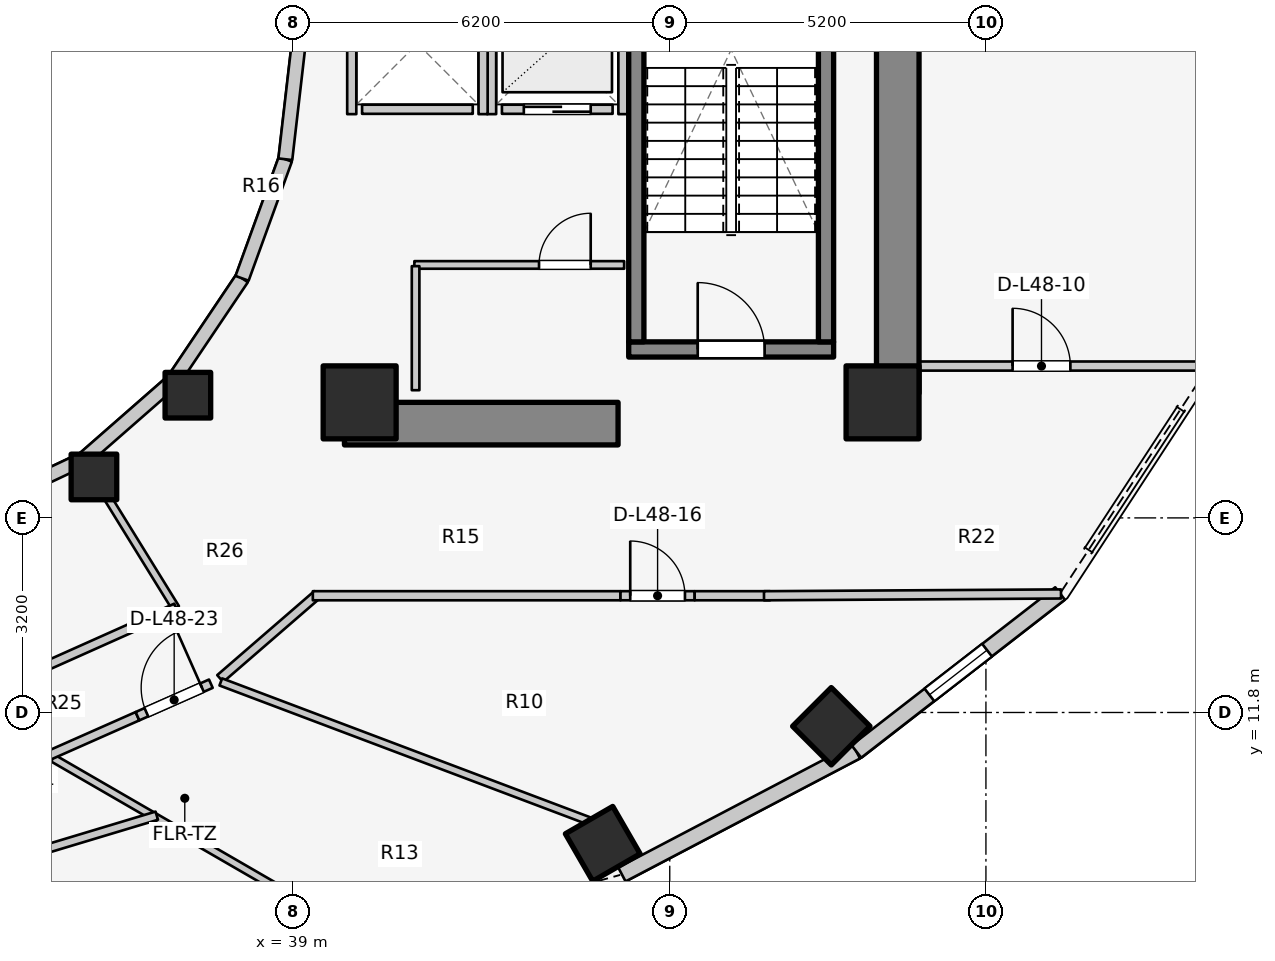
"""IFC4 building model, lengths in metres.
Left out: names, types, materials, properties, quantities, classifications, styles, units other than length and angle.
Written with IfcOpenShell. Run it as: python <this file> out.ifc"""

import sys

from ifc_helpers import new_model, si_unit, direction, frame, frame_2d, origin, origin_2d, place, context, subcontext, project, spatial, rectangle, extrude, element, fill, save


model = new_model("IFC4")
c1 = context("Model", 3, precision=1e-05, world=origin(), true_north=direction((0.0, 1.0)))
c2 = subcontext(c1, "Body", "Model", "MODEL_VIEW")
j1 = project(units=[si_unit("LENGTHUNIT", "METRE"), si_unit("PLANEANGLEUNIT", "RADIAN")], contexts=[c1])
p1 = place(None, origin())
s1 = spatial("IfcSite", under=j1, at=p1, CompositionType="ELEMENT")
p2 = place(p1, origin())
s2 = spatial("IfcBuilding", under=s1, at=p2, CompositionType="ELEMENT")
p3 = place(p2, frame((0.0, 0.0, 159.1)))
s3 = spatial("IfcBuildingStorey", under=s2, at=p3, CompositionType="ELEMENT", Elevation=159.1)
p4 = place(p3, frame((48.95, 17.05, 0.0), z_axis=(0.0, 0.0, 1.0), x_axis=(0.0, 1.0, 0.0)))
e1 = element("IfcWall", 1, at=p4, inside=s3, PredefinedType="SHEAR", context=c2, shape_type="SweptSolid", body=[
    extrude(rectangle(XDim=12.8, YDim=0.7, at=frame_2d((6.4, 0.0))), origin(), (0.0, 0.0, 1.0), 3.1),
])
p5 = place(p3, frame((39.85, 16.55, 0.0), z_axis=(0.0, 0.0, 1.0), x_axis=(1.0, 0.0, 0.0)))
e2 = element("IfcWall", 2, at=p5, inside=s3, PredefinedType="SHEAR", context=c2, shape_type="SweptSolid", body=[
    extrude(rectangle(XDim=4.5, YDim=0.7, at=frame_2d((2.25, 0.0))), origin(), (0.0, 0.0, 1.0), 3.1),
])
p6 = place(p3, frame((44.525, 17.77, 0.0), z_axis=(0.0, 0.0, 1.0), x_axis=(1.0, 0.0, 0.0)))
e3 = element("IfcWall", 3, at=p6, inside=s3, PredefinedType="SOLIDWALL", context=c2, shape_type="SweptSolid", body=[
    extrude(rectangle(XDim=3.37, YDim=0.25, at=frame_2d((1.685, 0.0))), origin(), (0.0, 0.0, 1.0), 3.1),
])
p7 = place(p6, frame((1.135, 0.0, 0.0)))
e4 = element("IfcOpeningElement", 4, at=p7, cuts=e3, PredefinedType="OPENING", context=c2, shape_type="SweptSolid", body=[
    extrude(rectangle(XDim=1.1, YDim=2.1, at=frame_2d((0.55, 1.05))), frame((0.0, 0.135, 0.0), z_axis=(0.0, -1.0, 0.0), x_axis=(1.0, 0.0, 0.0)), (0.0, 0.0, 1.0), 0.27),
])
for number, where, z_axis, x_axis in (
    (5, (44.65, 17.895, 0.0), (0.0, 0.0, 1.0), (0.0, 1.0, 0.0)),
    (6, (47.77, 17.895, 0.0), (0.0, 0.0, 1.0), (0.0, 1.0, 0.0)),
):
    element("IfcWall", number, at=place(p3, frame(where, z_axis=z_axis, x_axis=x_axis)), inside=s3, PredefinedType="SOLIDWALL", context=c2, shape_type="SweptSolid", body=[
        extrude(rectangle(XDim=7.81, YDim=0.25, at=frame_2d((3.905, 0.0))), origin(), (0.0, 0.0, 1.0), 3.1),
    ])
for number, where, z_axis, x_axis in (
    (7, (40.1, 16.9, 0.0), (0.0, 0.0, 1.0), (1.0, 0.0, 0.0)),
    (8, (48.7, 16.9, 0.0), (0.0, 0.0, 1.0), (1.0, 0.0, 0.0)),
):
    element("IfcColumn", number, at=place(p3, frame(where, z_axis=z_axis, x_axis=x_axis)), inside=s3, PredefinedType="COLUMN", context=c2, shape_type="SweptSolid", body=[
        extrude(rectangle(XDim=1.2, YDim=1.2, at=origin_2d()), origin(), (0.0, 0.0, 1.0), 3.1),
    ])
p8 = place(p3, frame((35.73, 15.673, 0.0), z_axis=(0.0, 0.0, 1.0), x_axis=(1.0, 0.0, 0.0)))
e9 = element("IfcColumn", 9, at=p8, inside=s3, PredefinedType="COLUMN", context=c2, shape_type="SweptSolid", body=[
    extrude(rectangle(XDim=0.75, YDim=0.75, at=origin_2d()), origin(), (0.0, 0.0, 1.0), 3.1),
])
p9 = place(p3, frame((44.098, 9.641, 0.0), z_axis=(0.0, 0.0, 1.0), x_axis=(0.5, -0.866025403784, 0.0)))
e10 = element("IfcColumn", 10, at=p9, inside=s3, PredefinedType="COLUMN", context=c2, shape_type="SweptSolid", body=[
    extrude(rectangle(XDim=0.9, YDim=0.9, at=origin_2d()), origin(), (0.0, 0.0, 1.0), 3.1),
])
p10 = place(p3, frame((37.275, 17.018, 0.0), z_axis=(0.0, 0.0, 1.0), x_axis=(1.0, 0.0, 0.0)))
e11 = element("IfcColumn", 11, at=p10, inside=s3, PredefinedType="COLUMN", context=c2, shape_type="SweptSolid", body=[
    extrude(rectangle(XDim=0.75, YDim=0.75, at=origin_2d()), origin(), (0.0, 0.0, 1.0), 3.1),
])
p11 = place(p3, frame((47.857, 11.573, 0.0), z_axis=(0.0, 0.0, 1.0), x_axis=(0.707106781187, -0.707106781187, 0.0)))
e12 = element("IfcColumn", 12, at=p11, inside=s3, PredefinedType="COLUMN", context=c2, shape_type="SweptSolid", body=[
    extrude(rectangle(XDim=0.9, YDim=0.9, at=origin_2d()), origin(), (0.0, 0.0, 1.0), 3.1),
])
p12 = place(p3, frame((33.843, 15.157, 0.0), z_axis=(0.0, 0.0, 1.0), x_axis=(0.904179699603, 0.427152280606, 0.0)))
e13 = element("IfcWall", 13, at=p12, inside=s3, PredefinedType="STANDARD", context=c2, shape_type="SweptSolid", body=[
    extrude(rectangle(XDim=1.899, YDim=0.23, at=frame_2d((0.95, 0.0))), origin(), (0.0, 0.0, 1.0), 1.22),
])
p13 = place(p3, frame((35.56, 15.968, 0.0), z_axis=(0.0, 0.0, 1.0), x_axis=(0.752576694707, 0.658504607869, 0.0)))
e14 = element("IfcWall", 14, at=p13, inside=s3, PredefinedType="STANDARD", context=c2, shape_type="SweptSolid", body=[
    extrude(rectangle(XDim=1.959, YDim=0.23, at=frame_2d((0.98, 0.0))), origin(), (0.0, 0.0, 1.0), 1.22),
])
p14 = place(p3, frame((37.035, 17.258, 0.0), z_axis=(0.0, 0.0, 1.0), x_axis=(0.558197800898, 0.829707909492, 0.0)))
e15 = element("IfcWall", 15, at=p14, inside=s3, PredefinedType="STANDARD", context=c2, shape_type="SweptSolid", body=[
    extrude(rectangle(XDim=2.027, YDim=0.23, at=frame_2d((1.013, 0.0))), origin(), (0.0, 0.0, 1.0), 1.22),
])
p15 = place(p3, frame((38.166, 18.94, 0.0), z_axis=(0.0, 0.0, 1.0), x_axis=(0.341423187295, 0.93990968033, 0.0)))
e16 = element("IfcWall", 16, at=p15, inside=s3, PredefinedType="STANDARD", context=c2, shape_type="SweptSolid", body=[
    extrude(rectangle(XDim=2.084, YDim=0.23, at=frame_2d((1.042, 0.0))), origin(), (0.0, 0.0, 1.0), 2.56),
])
p16 = place(p3, frame((38.877, 20.898, 0.0), z_axis=(0.0, 0.0, 1.0), x_axis=(0.114711713601, 0.993398823617, 0.0)))
e17 = element("IfcWall", 17, at=p16, inside=s3, PredefinedType="STANDARD", context=c2, shape_type="SweptSolid", body=[
    extrude(rectangle(XDim=2.115, YDim=0.23, at=frame_2d((1.058, 0.0))), origin(), (0.0, 0.0, 1.0), 2.56),
])
p17 = place(p3, frame((44.413, 9.137, 0.0), z_axis=(0.0, 0.0, 1.0), x_axis=(0.885660265226, 0.464333818065, 0.0)))
e18 = element("IfcWall", 18, at=p17, inside=s3, PredefinedType="STANDARD", context=c2, shape_type="SweptSolid", body=[
    extrude(rectangle(XDim=4.354, YDim=0.26, at=frame_2d((2.177, 0.0))), origin(), (0.0, 0.0, 1.0), 1.22),
])
p18 = place(p3, frame((48.269, 11.158, 0.0), z_axis=(0.0, 0.0, 1.0), x_axis=(0.790185650662, 0.612867552973, 0.0)))
e19 = element("IfcWall", 19, at=p18, inside=s3, PredefinedType="STANDARD", context=c2, shape_type="SweptSolid", body=[
    extrude(rectangle(XDim=4.239, YDim=0.26, at=frame_2d((2.12, 0.0))), origin(), (0.0, 0.0, 1.0), 1.22),
])
p19 = place(p18, frame((1.52, 0.0, 0.15)))
e20 = element("IfcOpeningElement", 20, at=p19, cuts=e19, PredefinedType="OPENING", context=c2, shape_type="SweptSolid", body=[
    extrude(rectangle(XDim=1.2, YDim=0.9, at=frame_2d((0.6, 0.45))), frame((0.0, 0.14, 0.0), z_axis=(0.0, -1.0, 0.0), x_axis=(1.0, 0.0, 0.0)), (0.0, 0.0, 1.0), 0.28),
])
p20 = place(p3, frame((42.44, 21.72, 0.0), z_axis=(0.0, 0.0, 1.0), x_axis=(1.0, 0.0, 0.0)))
e21 = element("IfcWall", 21, at=p20, inside=s3, PredefinedType="SOLIDWALL", context=c2, shape_type="SweptSolid", body=[
    extrude(rectangle(XDim=1.82, YDim=0.15, at=frame_2d((0.91, 0.0))), origin(), (0.0, 0.0, 1.0), 2.575),
])
p21 = place(p20, frame((0.36, 0.0, 0.0)))
e22 = element("IfcOpeningElement", 22, at=p21, cuts=e21, PredefinedType="OPENING", context=c2, shape_type="SweptSolid", body=[
    extrude(rectangle(XDim=1.1, YDim=2.1, at=frame_2d((0.55, 1.05))), frame((0.0, 0.085, 0.0), z_axis=(0.0, -1.0, 0.0), x_axis=(1.0, 0.0, 0.0)), (0.0, 0.0, 1.0), 0.17),
])
for number, where, z_axis, x_axis in (
    (23, (42.27, 21.64, 0.0), (0.0, 0.0, 1.0), (0.0, 1.0, 0.0)),
    (24, (44.43, 21.64, 0.0), (0.0, 0.0, 1.0), (0.0, 1.0, 0.0)),
):
    element("IfcWall", number, at=place(p3, frame(where, z_axis=z_axis, x_axis=x_axis)), inside=s3, PredefinedType="SOLIDWALL", context=c2, shape_type="SweptSolid", body=[
        extrude(rectangle(XDim=2.32, YDim=0.15, at=frame_2d((1.16, 0.0))), origin(), (0.0, 0.0, 1.0), 2.575),
    ])
p22 = place(p3, frame((40.14, 21.72, 0.0), z_axis=(0.0, 0.0, 1.0), x_axis=(1.0, 0.0, 0.0)))
e25 = element("IfcWall", 25, at=p22, inside=s3, PredefinedType="SOLIDWALL", context=c2, shape_type="SweptSolid", body=[
    extrude(rectangle(XDim=1.82, YDim=0.15, at=frame_2d((0.91, 0.0))), origin(), (0.0, 0.0, 1.0), 2.12),
])
p23 = place(p3, frame((39.97, 21.64, 0.0), z_axis=(0.0, 0.0, 1.0), x_axis=(0.0, 1.0, 0.0)))
e26 = element("IfcWall", 26, at=p23, inside=s3, PredefinedType="SOLIDWALL", context=c2, shape_type="SweptSolid", body=[
    extrude(rectangle(XDim=2.32, YDim=0.15, at=frame_2d((1.16, 0.0))), origin(), (0.0, 0.0, 1.0), 2.12),
])
p24 = place(p3, frame((42.13, 21.64, 0.0), z_axis=(0.0, 0.0, 1.0), x_axis=(0.0, 1.0, 0.0)))
e27 = element("IfcWall", 27, at=p24, inside=s3, PredefinedType="SOLIDWALL", context=c2, shape_type="SweptSolid", body=[
    extrude(rectangle(XDim=2.32, YDim=0.15, at=frame_2d((1.16, 0.0))), origin(), (0.0, 0.0, 1.0), 2.575),
])
p25 = place(p3, frame((41.0, 19.16, 0.0), z_axis=(0.0, 0.0, 1.0), x_axis=(1.0, 0.0, 0.0)))
e28 = element("IfcWall", 28, at=p25, inside=s3, PredefinedType="PARTITIONING", context=c2, shape_type="SweptSolid", body=[
    extrude(rectangle(XDim=3.45, YDim=0.125, at=frame_2d((1.725, 0.0))), origin(), (0.0, 0.0, 1.0), 2.12),
])
p26 = place(p25, frame((2.05, 0.0, 0.0)))
e29 = element("IfcOpeningElement", 29, at=p26, cuts=e28, PredefinedType="OPENING", context=c2, shape_type="SweptSolid", body=[
    extrude(rectangle(XDim=0.85, YDim=2.05, at=frame_2d((0.425, 1.025))), frame((0.0, 0.073, 0.0), z_axis=(0.0, -1.0, 0.0), x_axis=(1.0, 0.0, 0.0)), (0.0, 0.0, 1.0), 0.145),
])
p27 = place(p3, frame((41.02, 17.1, 0.0), z_axis=(0.0, 0.0, 1.0), x_axis=(0.0, 1.0, 0.0)))
e30 = element("IfcWall", 30, at=p27, inside=s3, PredefinedType="PARTITIONING", context=c2, shape_type="SweptSolid", body=[
    extrude(rectangle(XDim=2.04, YDim=0.125, at=frame_2d((1.02, 0.0))), origin(), (0.0, 0.0, 1.0), 2.575),
])
p28 = place(p3, frame((48.95, 17.497, 0.0), z_axis=(0.0, 0.0, 1.0), x_axis=(1.0, 0.0, 0.0)))
e31 = element("IfcWall", 31, at=p28, inside=s3, PredefinedType="PARTITIONING", context=c2, shape_type="SweptSolid", body=[
    extrude(rectangle(XDim=5.14, YDim=0.15, at=frame_2d((2.57, 0.0))), origin(), (0.0, 0.0, 1.0), 2.575),
])
p29 = place(p28, frame((1.889, 0.0, 0.0)))
e32 = element("IfcOpeningElement", 32, at=p29, cuts=e31, PredefinedType="OPENING", context=c2, shape_type="SweptSolid", body=[
    extrude(rectangle(XDim=0.95, YDim=2.1, at=frame_2d((0.475, 1.05))), frame((0.0, 0.085, 0.0), z_axis=(0.0, -1.0, 0.0), x_axis=(1.0, 0.0, 0.0)), (0.0, 0.0, 1.0), 0.17),
])
p30 = place(p3, frame((37.807, 12.358, 0.0), z_axis=(0.0, 0.0, 1.0), x_axis=(0.756055312247, 0.654507727092, 0.0)))
e33 = element("IfcWall", 33, at=p30, inside=s3, PredefinedType="PARTITIONING", context=c2, shape_type="SweptSolid", body=[
    extrude(rectangle(XDim=2.111, YDim=0.15, at=frame_2d((1.055, 0.0))), origin(), (0.0, 0.0, 1.0), 2.019),
])
p31 = place(p3, frame((39.33, 13.72, 0.0), z_axis=(0.0, 0.0, 1.0), x_axis=(1.0, 0.0, 0.0)))
e34 = element("IfcWall", 34, at=p31, inside=s3, PredefinedType="PARTITIONING", context=c2, shape_type="SweptSolid", body=[
    extrude(rectangle(XDim=5.06, YDim=0.15, at=frame_2d((2.53, 0.0))), origin(), (0.0, 0.0, 1.0), 2.019),
])
p32 = place(p3, frame((44.39, 13.72, 0.0), z_axis=(0.0, 0.0, 1.0), x_axis=(1.0, 0.0, 0.0)))
e35 = element("IfcWall", 35, at=p32, inside=s3, PredefinedType="PARTITIONING", context=c2, shape_type="SweptSolid", body=[
    extrude(rectangle(XDim=1.22, YDim=0.15, at=frame_2d((0.61, 0.0))), origin(), (0.0, 0.0, 1.0), 2.575),
])
p33 = place(p32, frame((0.16, 0.0, 0.0)))
e36 = element("IfcOpeningElement", 36, at=p33, cuts=e35, PredefinedType="OPENING", context=c2, shape_type="SweptSolid", body=[
    extrude(rectangle(XDim=0.9, YDim=2.1, at=frame_2d((0.45, 1.05))), frame((0.0, 0.085, 0.0), z_axis=(0.0, -1.0, 0.0), x_axis=(1.0, 0.0, 0.0)), (0.0, 0.0, 1.0), 0.17),
])
p34 = place(p3, frame((45.61, 13.72, 0.0), z_axis=(0.0, 0.0, 1.0), x_axis=(1.0, 0.0, 0.0)))
e37 = element("IfcWall", 37, at=p34, inside=s3, PredefinedType="PARTITIONING", context=c2, shape_type="SweptSolid", body=[
    extrude(rectangle(XDim=1.24, YDim=0.15, at=frame_2d((0.62, 0.0))), origin(), (0.0, 0.0, 1.0), 2.575),
])
p35 = place(p3, frame((46.75, 13.72, 0.0), z_axis=(0.0, 0.0, 1.0), x_axis=(0.999981712056, 0.006047772638, 0.0)))
e38 = element("IfcWall", 38, at=p35, inside=s3, PredefinedType="PARTITIONING", context=c2, shape_type="SweptSolid", body=[
    extrude(rectangle(XDim=4.885, YDim=0.15, at=frame_2d((2.442, 0.0))), origin(), (0.0, 0.0, 1.0), 1.22),
])
p36 = place(p3, frame((35.55, 15.985, 0.0), z_axis=(0.0, 0.0, 1.0), x_axis=(0.525627246902, -0.850714991824, 0.0)))
e39 = element("IfcWall", 39, at=p36, inside=s3, PredefinedType="PARTITIONING", context=c2, shape_type="SweptSolid", body=[
    extrude(rectangle(XDim=2.901, YDim=0.125, at=frame_2d((1.451, 0.0))), origin(), (0.0, 0.0, 1.0), 2.019),
])
p37 = place(p3, frame((34.625, 12.423, 0.0), z_axis=(0.0, 0.0, 1.0), x_axis=(0.912888568324, 0.408208845842, 0.0)))
e40 = element("IfcWall", 40, at=p37, inside=s3, PredefinedType="PARTITIONING", context=c2, shape_type="SweptSolid", body=[
    extrude(rectangle(XDim=2.69, YDim=0.15, at=frame_2d((1.345, 0.0))), origin(), (0.0, 0.0, 1.0), 2.019),
])
p38 = place(p3, frame((35.032, 11.062, 0.0), z_axis=(0.0, 0.0, 1.0), x_axis=(0.865627016774, -0.500689392568, 0.0)))
e41 = element("IfcWall", 41, at=p38, inside=s3, PredefinedType="PARTITIONING", context=c2, shape_type="SweptSolid", body=[
    extrude(rectangle(XDim=4.662, YDim=0.125, at=frame_2d((2.331, 0.0))), origin(), (0.0, 0.0, 1.0), 1.22),
])
p39 = place(p3, frame((37.816, 12.302, 0.0), z_axis=(0.0, 0.0, 1.0), x_axis=(0.935601484289, -0.353057874288, 0.0)))
e42 = element("IfcWall", 42, at=p39, inside=s3, PredefinedType="PARTITIONING", context=c2, shape_type="SweptSolid", body=[
    extrude(rectangle(XDim=6.484, YDim=0.125, at=frame_2d((3.242, 0.0))), origin(), (0.0, 0.0, 1.0), 1.22),
])
p40 = place(p3, frame((34.942, 9.555, 0.0), z_axis=(0.0, 0.0, 1.0), x_axis=(0.957624692509, 0.288019006834, 0.0)))
e43 = element("IfcWall", 43, at=p40, inside=s3, PredefinedType="PLUMBINGWALL", context=c2, shape_type="SweptSolid", body=[
    extrude(rectangle(XDim=1.902, YDim=0.14, at=frame_2d((0.951, 0.0))), origin(), (0.0, 0.0, 1.0), 2.575),
])
p41 = place(p3, frame((34.976, 11.088, 0.0), z_axis=(0.0, 0.0, 1.0), x_axis=(0.914324480558, 0.404982399928, 0.0)))
e44 = element("IfcWall", 44, at=p41, inside=s3, PredefinedType="PARTITIONING", context=c2, shape_type="SweptSolid", body=[
    extrude(rectangle(XDim=1.607, YDim=0.15, at=frame_2d((0.804, 0.0))), origin(), (0.0, 0.0, 1.0), 2.019),
])
p42 = place(p3, frame((36.446, 11.739, 0.0), z_axis=(0.0, 0.0, 1.0), x_axis=(0.914314172667, 0.405005671145, 0.0)))
e45 = element("IfcWall", 45, at=p42, inside=s3, PredefinedType="PARTITIONING", context=c2, shape_type="SweptSolid", body=[
    extrude(rectangle(XDim=1.32, YDim=0.15, at=frame_2d((0.66, 0.0))), origin(), (0.0, 0.0, 1.0), 2.16),
])
p43 = place(p42, frame((0.16, 0.0, 0.0)))
e46 = element("IfcOpeningElement", 46, at=p43, cuts=e45, PredefinedType="OPENING", context=c2, shape_type="SweptSolid", body=[
    extrude(rectangle(XDim=1.0, YDim=2.1, at=frame_2d((0.5, 1.05))), frame((0.0, 0.085, 0.0), z_axis=(0.0, -1.0, 0.0), x_axis=(1.0, 0.0, 0.0)), (0.0, 0.0, 1.0), 0.17),
])
p44 = place(p19, origin())
e47 = element("IfcWindow", 47, at=p44, inside=s3, PartitioningType="SINGLE_PANEL", PredefinedType="WINDOW", context=c2, shape_type="SweptSolid", body=[
    extrude(rectangle(XDim=1.2, YDim=0.9, at=frame_2d((0.6, 0.45))), frame((0.0, 0.03, 0.0), z_axis=(0.0, -1.0, 0.0), x_axis=(1.0, 0.0, 0.0)), (0.0, 0.0, 1.0), 0.06),
])
fill(e20, e47)
p45 = place(p7, origin())
e48 = element("IfcDoor", 48, at=p45, inside=s3, OperationType="SINGLE_SWING_LEFT", PredefinedType="DOOR", context=c2, shape_type="SweptSolid", body=[
    extrude(rectangle(XDim=1.1, YDim=2.1, at=frame_2d((0.55, 1.05))), frame((0.0, 0.025, 0.0), z_axis=(0.0, -1.0, 0.0), x_axis=(1.0, 0.0, 0.0)), (0.0, 0.0, 1.0), 0.05),
])
fill(e4, e48)
p46 = place(p21, origin())
e49 = element("IfcDoor", 49, at=p46, inside=s3, OperationType="DOUBLE_DOOR_SLIDING", PredefinedType="DOOR", context=c2, shape_type="SweptSolid", body=[
    extrude(rectangle(XDim=1.1, YDim=2.1, at=frame_2d((0.55, 1.05))), frame((0.0, 0.025, 0.0), z_axis=(0.0, -1.0, 0.0), x_axis=(1.0, 0.0, 0.0)), (0.0, 0.0, 1.0), 0.05),
])
fill(e22, e49)
p47 = place(p26, origin())
e50 = element("IfcDoor", 50, at=p47, inside=s3, OperationType="SINGLE_SWING_RIGHT", PredefinedType="DOOR", context=c2, shape_type="SweptSolid", body=[
    extrude(rectangle(XDim=0.85, YDim=2.05, at=frame_2d((0.425, 1.025))), frame((0.0, 0.025, 0.0), z_axis=(0.0, -1.0, 0.0), x_axis=(1.0, 0.0, 0.0)), (0.0, 0.0, 1.0), 0.05),
])
fill(e29, e50)
p48 = place(p29, origin())
e51 = element("IfcDoor", 51, at=p48, inside=s3, OperationType="SINGLE_SWING_LEFT", PredefinedType="DOOR", context=c2, shape_type="SweptSolid", body=[
    extrude(rectangle(XDim=0.95, YDim=2.1, at=frame_2d((0.475, 1.05))), frame((0.0, 0.025, 0.0), z_axis=(0.0, -1.0, 0.0), x_axis=(1.0, 0.0, 0.0)), (0.0, 0.0, 1.0), 0.05),
])
fill(e32, e51)
p49 = place(p33, origin())
e52 = element("IfcDoor", 52, at=p49, inside=s3, OperationType="SINGLE_SWING_LEFT", PredefinedType="DOOR", context=c2, shape_type="SweptSolid", body=[
    extrude(rectangle(XDim=0.9, YDim=2.1, at=frame_2d((0.45, 1.05))), frame((0.0, 0.025, 0.0), z_axis=(0.0, -1.0, 0.0), x_axis=(1.0, 0.0, 0.0)), (0.0, 0.0, 1.0), 0.05),
])
fill(e36, e52)
p50 = place(p43, origin())
e53 = element("IfcDoor", 53, at=p50, inside=s3, OperationType="SINGLE_SWING_RIGHT", PredefinedType="DOOR", context=c2, shape_type="SweptSolid", body=[
    extrude(rectangle(XDim=1.0, YDim=2.1, at=frame_2d((0.5, 1.05))), frame((0.0, 0.025, 0.0), z_axis=(0.0, -1.0, 0.0), x_axis=(1.0, 0.0, 0.0)), (0.0, 0.0, 1.0), 0.05),
])
fill(e46, e53)
save(model, sys.argv[1])
